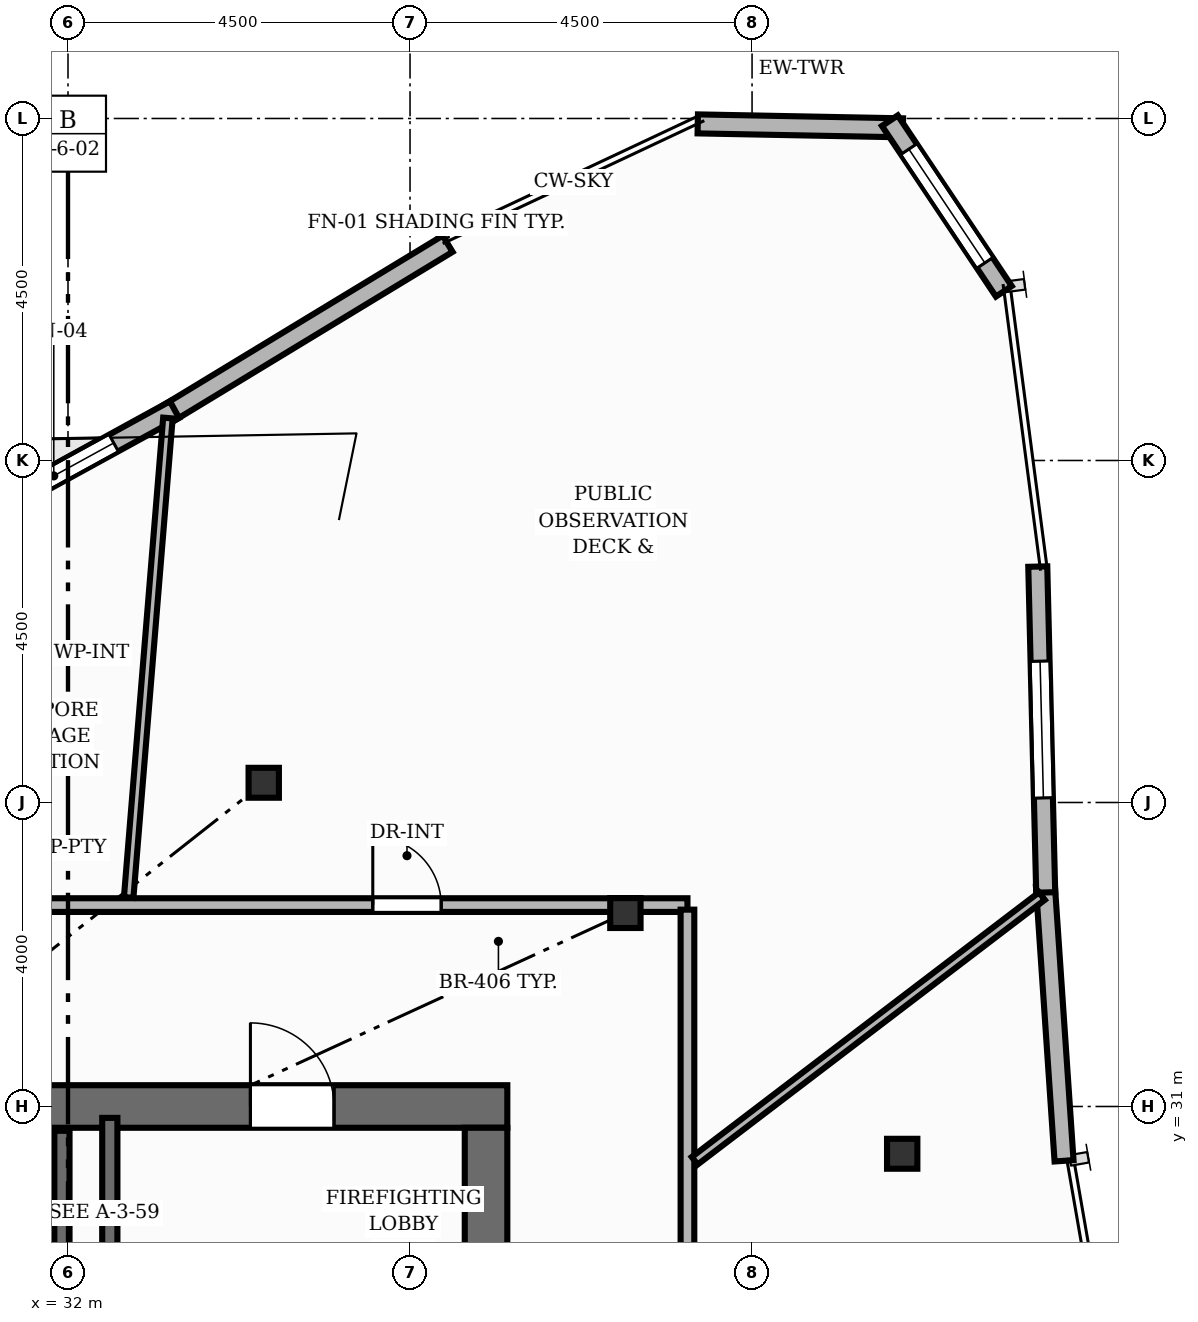
"""IFC4 building model, lengths in metres.
Left out: names, types, materials, properties, quantities, classifications, styles, units other than length and angle.
Written with IfcOpenShell. Run it as: python <this file> out.ifc"""

import sys

from ifc_helpers import new_model, si_unit, direction, frame, frame_2d, origin, origin_2d, place, context, subcontext, project, spatial, rectangle, i_section, extrude, element, fill, save


model = new_model("IFC4")
c1 = context("Model", 3, precision=1e-05, world=origin(), true_north=direction((0.0, 1.0)))
c2 = subcontext(c1, "Body", "Model", "MODEL_VIEW")
j1 = project(units=[si_unit("LENGTHUNIT", "METRE"), si_unit("PLANEANGLEUNIT", "RADIAN")], contexts=[c1])
p1 = place(None, origin())
s1 = spatial("IfcSite", under=j1, at=p1, CompositionType="ELEMENT")
p2 = place(p1, origin())
s2 = spatial("IfcBuilding", under=s1, at=p2, CompositionType="ELEMENT")
p3 = place(p2, frame((0.0, 0.0, 243.04)))
s3 = spatial("IfcBuildingStorey", under=s2, at=p3, CompositionType="ELEMENT", Elevation=243.04)
p4 = place(p3, frame((26.22, 31.0, 0.0), z_axis=(0.0, 0.0, 1.0), x_axis=(1.0, 0.0, 0.0)))
e1 = element("IfcWall", 1, at=p4, inside=s3, PredefinedType="SHEAR", context=c2, shape_type="SweptSolid", body=[
    extrude(rectangle(XDim=11.56, YDim=0.56, at=frame_2d((5.78, 0.0))), origin(), (0.0, 0.0, 1.0), 3.84),
])
p5 = place(p4, frame((8.18, 0.0, 0.0)))
e2 = element("IfcOpeningElement", 2, at=p5, cuts=e1, PredefinedType="OPENING", context=c2, shape_type="SweptSolid", body=[
    extrude(rectangle(XDim=1.1, YDim=2.0, at=frame_2d((0.55, 1.0))), frame((0.0, 0.29, 0.0), z_axis=(0.0, -1.0, 0.0), x_axis=(1.0, 0.0, 0.0)), (0.0, 0.0, 1.0), 0.58),
])
p6 = place(p3, frame((37.5, 17.28, 0.0), z_axis=(0.0, 0.0, 1.0), x_axis=(0.0, 1.0, 0.0)))
e3 = element("IfcWall", 3, at=p6, inside=s3, PredefinedType="SHEAR", context=c2, shape_type="SweptSolid", body=[
    extrude(rectangle(XDim=13.44, YDim=0.56, at=frame_2d((6.72, 0.0))), origin(), (0.0, 0.0, 1.0), 3.84),
])
for number, where, z_axis, x_axis in (
    (4, (42.975, 30.378, 0.0), (0.0, 0.0, 1.0), (1.0, 0.0, 0.0)),
    (5, (39.333, 33.545, 0.0), (0.0, 0.0, 1.0), (1.0, 0.0, 0.0)),
    (6, (34.575, 35.26, 0.0), (0.0, 0.0, 1.0), (1.0, 0.0, 0.0)),
):
    element("IfcColumn", number, at=place(p3, frame(where, z_axis=z_axis, x_axis=x_axis)), inside=s3, PredefinedType="COLUMN", context=c2, shape_type="SweptSolid", body=[
        extrude(i_section(OverallWidth=0.399, OverallDepth=0.394, WebThickness=0.023, FlangeThickness=0.037, at=origin_2d()), origin(), (0.0, 0.0, 1.0), 3.84),
    ])
p7 = place(p3, frame((40.286, 43.929, 0.0), z_axis=(0.0, 0.0, 1.0), x_axis=(0.999816175045, -0.019173317875, 0.0)))
e7 = element("IfcWall", 7, at=p7, inside=s3, PredefinedType="SOLIDWALL", context=c2, shape_type="SweptSolid", body=[
    extrude(rectangle(XDim=2.699, YDim=0.25, at=frame_2d((1.35, 0.0))), origin(), (0.0, 0.0, 1.0), 3.52),
])
p8 = place(p3, frame((33.328, 40.127, 0.0), z_axis=(0.0, 0.0, 1.0), x_axis=(0.854986749767, 0.518649841148, 0.0)))
e8 = element("IfcWall", 8, at=p8, inside=s3, PredefinedType="SOLIDWALL", context=c2, shape_type="SweptSolid", body=[
    extrude(rectangle(XDim=4.289, YDim=0.25, at=frame_2d((2.145, 0.0))), origin(), (0.0, 0.0, 1.0), 3.52),
])
p9 = place(p3, frame((30.224, 38.425, 0.0), z_axis=(0.0, 0.0, 1.0), x_axis=(0.876630929742, 0.481163395344, 0.0)))
e9 = element("IfcWall", 9, at=p9, inside=s3, PredefinedType="SOLIDWALL", context=c2, shape_type="SweptSolid", body=[
    extrude(rectangle(XDim=3.624, YDim=0.25, at=frame_2d((1.812, 0.0))), origin(), (0.0, 0.0, 1.0), 3.52),
])
p10 = place(p9, frame((0.912, 0.0, 0.85)))
e10 = element("IfcOpeningElement", 10, at=p10, cuts=e9, PredefinedType="OPENING", context=c2, shape_type="SweptSolid", body=[
    extrude(rectangle(XDim=1.8, YDim=2.0, at=frame_2d((0.9, 1.0))), frame((0.0, 0.135, 0.0), z_axis=(0.0, -1.0, 0.0), x_axis=(1.0, 0.0, 0.0)), (0.0, 0.0, 1.0), 0.27),
])
p11 = place(p3, frame((44.86, 33.901, 0.0), z_axis=(0.0, 0.0, 1.0), x_axis=(0.067708398877, -0.9977051532, 0.0)))
e11 = element("IfcWall", 11, at=p11, inside=s3, PredefinedType="SOLIDWALL", context=c2, shape_type="SweptSolid", body=[
    extrude(rectangle(XDim=3.624, YDim=0.25, at=frame_2d((1.812, 0.0))), origin(), (0.0, 0.0, 1.0), 3.52),
])
p12 = place(p3, frame((44.759, 38.104, 0.0), z_axis=(0.0, 0.0, 1.0), x_axis=(0.024363566468, -0.999703164259, 0.0)))
e12 = element("IfcWall", 12, at=p12, inside=s3, PredefinedType="SOLIDWALL", context=c2, shape_type="SweptSolid", body=[
    extrude(rectangle(XDim=4.289, YDim=0.25, at=frame_2d((2.145, 0.0))), origin(), (0.0, 0.0, 1.0), 3.52),
])
p13 = place(p12, frame((1.245, 0.0, 0.85)))
e13 = element("IfcOpeningElement", 13, at=p13, cuts=e12, PredefinedType="OPENING", context=c2, shape_type="SweptSolid", body=[
    extrude(rectangle(XDim=1.8, YDim=2.0, at=frame_2d((0.9, 1.0))), frame((0.0, 0.135, 0.0), z_axis=(0.0, -1.0, 0.0), x_axis=(1.0, 0.0, 0.0)), (0.0, 0.0, 1.0), 0.27),
])
p14 = place(p3, frame((42.813, 43.971, 0.0), z_axis=(0.0, 0.0, 1.0), x_axis=(0.555451275578, -0.831549084816, 0.0)))
e14 = element("IfcWall", 14, at=p14, inside=s3, PredefinedType="SOLIDWALL", context=c2, shape_type="SweptSolid", body=[
    extrude(rectangle(XDim=2.7, YDim=0.25, at=frame_2d((1.35, 0.0))), origin(), (0.0, 0.0, 1.0), 3.52),
])
p15 = place(p14, frame((0.45, 0.0, 0.85)))
e15 = element("IfcOpeningElement", 15, at=p15, cuts=e14, PredefinedType="OPENING", context=c2, shape_type="SweptSolid", body=[
    extrude(rectangle(XDim=1.8, YDim=2.0, at=frame_2d((0.9, 1.0))), frame((0.0, 0.135, 0.0), z_axis=(0.0, -1.0, 0.0), x_axis=(1.0, 0.0, 0.0)), (0.0, 0.0, 1.0), 0.27),
])
p16 = place(p3, frame((32.55, 27.35, 0.0), z_axis=(0.0, 0.0, 1.0), x_axis=(0.0, 1.0, 0.0)))
e16 = element("IfcWall", 16, at=p16, inside=s3, PredefinedType="SHEAR", context=c2, shape_type="SweptSolid", body=[
    extrude(rectangle(XDim=3.5, YDim=0.2, at=frame_2d((1.75, 0.0))), origin(), (0.0, 0.0, 1.0), 3.84),
])
p17 = place(p3, frame((31.92, 29.02, 0.0), z_axis=(0.0, 0.0, 1.0), x_axis=(0.0, 1.0, 0.0)))
e17 = element("IfcWall", 17, at=p17, inside=s3, PredefinedType="SHEAR", context=c2, shape_type="SweptSolid", body=[
    extrude(rectangle(XDim=1.66, YDim=0.2, at=frame_2d((0.83, 0.0))), origin(), (0.0, 0.0, 1.0), 3.84),
])
p18 = place(p3, frame((23.85, 33.65, 0.0), z_axis=(0.0, 0.0, 1.0), x_axis=(1.0, 0.0, 0.0)))
e18 = element("IfcWall", 18, at=p18, inside=s3, PredefinedType="PARTITIONING", context=c2, shape_type="SweptSolid", body=[
    extrude(rectangle(XDim=16.3, YDim=0.18, at=frame_2d((8.15, 0.0))), origin(), (0.0, 0.0, 1.0), 2.878),
])
p19 = place(p18, frame((12.16, 0.0, 0.0)))
e19 = element("IfcOpeningElement", 19, at=p19, cuts=e18, PredefinedType="OPENING", context=c2, shape_type="SweptSolid", body=[
    extrude(rectangle(XDim=0.9, YDim=2.1, at=frame_2d((0.45, 1.05))), frame((0.0, 0.1, 0.0), z_axis=(0.0, -1.0, 0.0), x_axis=(1.0, 0.0, 0.0)), (0.0, 0.0, 1.0), 0.2),
])
p20 = place(p18, frame((4.03, 0.0, 0.0)))
e20 = element("IfcOpeningElement", 20, at=p20, cuts=e18, PredefinedType="OPENING", context=c2, shape_type="SweptSolid", body=[
    extrude(rectangle(XDim=0.9, YDim=2.1, at=frame_2d((0.45, 1.05))), frame((0.0, 0.1, 0.0), z_axis=(0.0, -1.0, 0.0), x_axis=(1.0, 0.0, 0.0)), (0.0, 0.0, 1.0), 0.2),
])
p21 = place(p3, frame((40.15, 33.59, 0.0), z_axis=(0.0, 0.0, 1.0), x_axis=(0.0, -1.0, 0.0)))
e21 = element("IfcWall", 21, at=p21, inside=s3, PredefinedType="PARTITIONING", context=c2, shape_type="SweptSolid", body=[
    extrude(rectangle(XDim=15.045, YDim=0.18, at=frame_2d((7.523, 0.0))), origin(), (0.0, 0.0, 1.0), 3.515),
])
p22 = place(p21, frame((8.749, 0.0, 0.0)))
e22 = element("IfcOpeningElement", 22, at=p22, cuts=e21, PredefinedType="OPENING", context=c2, shape_type="SweptSolid", body=[
    extrude(rectangle(XDim=0.9, YDim=2.1, at=frame_2d((0.45, 1.05))), frame((0.0, 0.1, 0.0), z_axis=(0.0, -1.0, 0.0), x_axis=(1.0, 0.0, 0.0)), (0.0, 0.0, 1.0), 0.2),
])
p23 = place(p3, frame((32.798, 33.75, 0.0), z_axis=(0.0, 0.0, 1.0), x_axis=(0.081612219351, 0.996664158908, 0.0)))
e23 = element("IfcWall", 23, at=p23, inside=s3, PredefinedType="PARTITIONING", context=c2, shape_type="SweptSolid", body=[
    extrude(rectangle(XDim=6.33, YDim=0.125, at=frame_2d((3.165, 0.0))), origin(), (0.0, 0.0, 1.0), 3.515),
])
p24 = place(p3, frame((44.813, 33.768, 0.0), z_axis=(0.0, 0.0, 1.0), x_axis=(-0.795267778137, -0.606258328649, 0.0)))
e24 = element("IfcWall", 24, at=p24, inside=s3, PredefinedType="PARTITIONING", context=c2, shape_type="SweptSolid", body=[
    extrude(rectangle(XDim=5.744, YDim=0.125, at=frame_2d((2.872, 0.0))), origin(), (0.0, 0.0, 1.0), 3.515),
])
p25 = place(p10, origin())
e25 = element("IfcWindow", 25, at=p25, inside=s3, PartitioningType="SINGLE_PANEL", PredefinedType="WINDOW", context=c2, shape_type="SweptSolid", body=[
    extrude(rectangle(XDim=1.8, YDim=2.0, at=frame_2d((0.9, 1.0))), frame((0.0, 0.03, 0.0), z_axis=(0.0, -1.0, 0.0), x_axis=(1.0, 0.0, 0.0)), (0.0, 0.0, 1.0), 0.06),
])
fill(e10, e25)
p26 = place(p13, origin())
e26 = element("IfcWindow", 26, at=p26, inside=s3, PartitioningType="SINGLE_PANEL", PredefinedType="WINDOW", context=c2, shape_type="SweptSolid", body=[
    extrude(rectangle(XDim=1.8, YDim=2.0, at=frame_2d((0.9, 1.0))), frame((0.0, 0.03, 0.0), z_axis=(0.0, -1.0, 0.0), x_axis=(1.0, 0.0, 0.0)), (0.0, 0.0, 1.0), 0.06),
])
fill(e13, e26)
p27 = place(p15, origin())
e27 = element("IfcWindow", 27, at=p27, inside=s3, PartitioningType="SINGLE_PANEL", PredefinedType="WINDOW", context=c2, shape_type="SweptSolid", body=[
    extrude(rectangle(XDim=1.8, YDim=2.0, at=frame_2d((0.9, 1.0))), frame((0.0, 0.03, 0.0), z_axis=(0.0, -1.0, 0.0), x_axis=(1.0, 0.0, 0.0)), (0.0, 0.0, 1.0), 0.06),
])
fill(e15, e27)
p28 = place(p5, origin())
e28 = element("IfcDoor", 28, at=p28, inside=s3, OperationType="SINGLE_SWING_LEFT", PredefinedType="DOOR", context=c2, shape_type="SweptSolid", body=[
    extrude(rectangle(XDim=1.1, YDim=2.0, at=frame_2d((0.55, 1.0))), frame((0.0, 0.025, 0.0), z_axis=(0.0, -1.0, 0.0), x_axis=(1.0, 0.0, 0.0)), (0.0, 0.0, 1.0), 0.05),
])
fill(e2, e28)
p29 = place(p19, origin())
e29 = element("IfcDoor", 29, at=p29, inside=s3, OperationType="SINGLE_SWING_LEFT", PredefinedType="DOOR", context=c2, shape_type="SweptSolid", body=[
    extrude(rectangle(XDim=0.9, YDim=2.1, at=frame_2d((0.45, 1.05))), frame((0.0, 0.025, 0.0), z_axis=(0.0, -1.0, 0.0), x_axis=(1.0, 0.0, 0.0)), (0.0, 0.0, 1.0), 0.05),
])
fill(e19, e29)
save(model, sys.argv[1])
